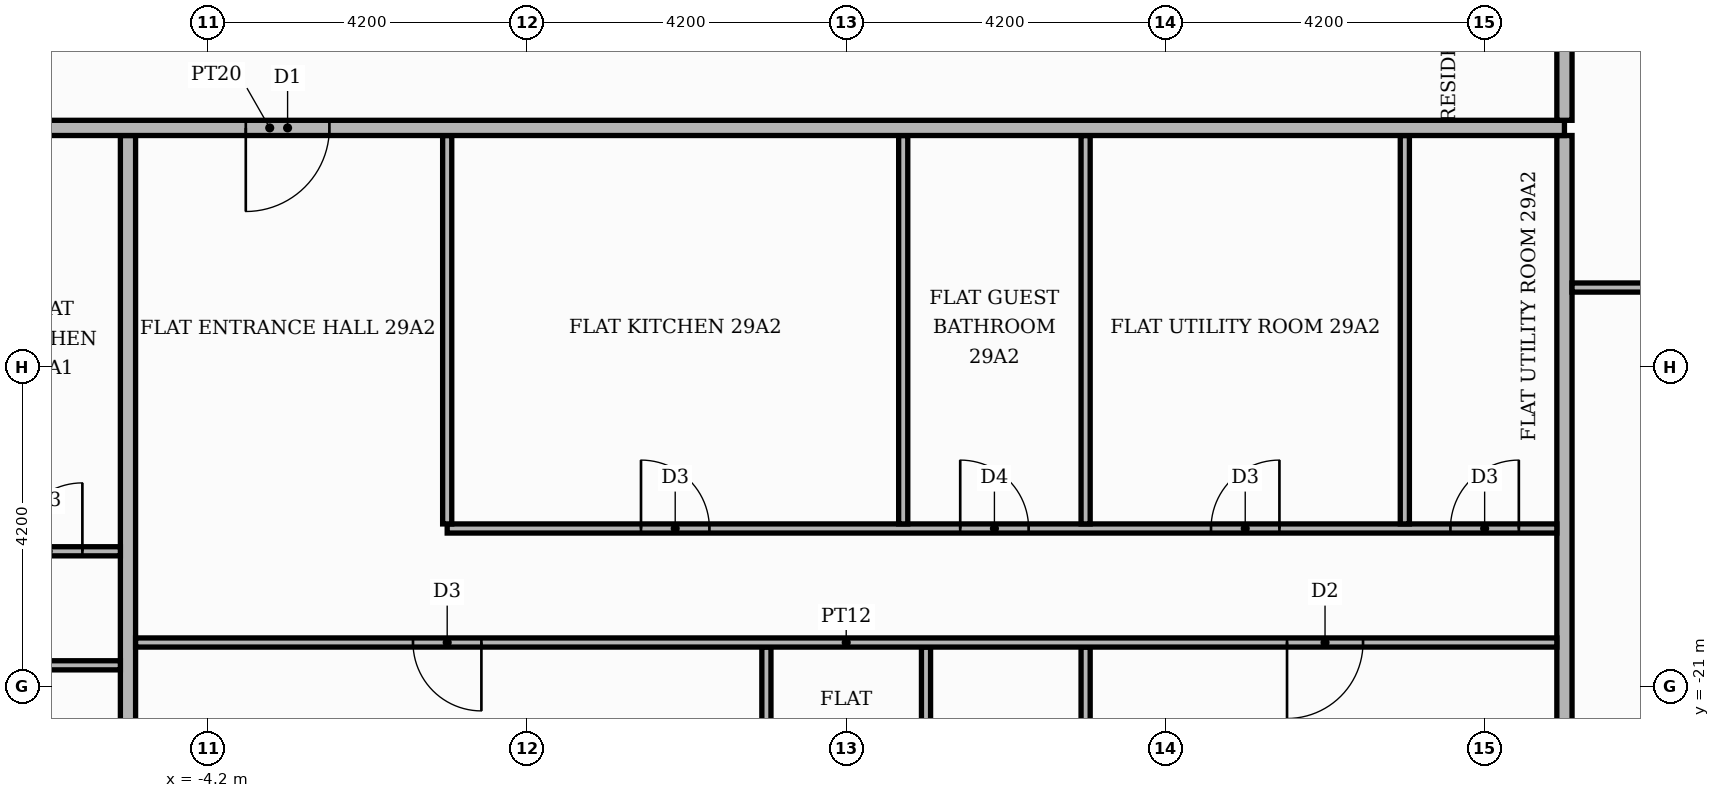
"""IFC4 building model, lengths in metres.
Left out: names, types, materials, properties, quantities, classifications, styles, units other than length and angle.
Written with IfcOpenShell. Run it as: python <this file> out.ifc"""

import sys

from ifc_helpers import new_model, si_unit, direction, frame, frame_2d, origin, place, context, subcontext, project, spatial, rectangle, extrude, element, fill, save


model = new_model("IFC4")
c1 = context("Model", 3, precision=1e-05, world=origin(), true_north=direction((0.0, 1.0)))
c2 = subcontext(c1, "Body", "Model", "MODEL_VIEW")
j1 = project(units=[si_unit("LENGTHUNIT", "METRE"), si_unit("PLANEANGLEUNIT", "RADIAN")], contexts=[c1])
p1 = place(None, origin())
s1 = spatial("IfcSite", under=j1, at=p1, CompositionType="ELEMENT")
p2 = place(p1, origin())
s2 = spatial("IfcBuilding", under=s1, at=p2, CompositionType="ELEMENT")
p3 = place(p2, frame((0.0, 0.0, 122.1)))
s3 = spatial("IfcBuildingStorey", under=s2, at=p3, CompositionType="ELEMENT", Elevation=122.1)
p4 = place(p3, frame((-5.25, -25.42, 0.0), z_axis=(0.0, 0.0, 1.0), x_axis=(0.0, 1.0, 0.0)))
e1 = element("IfcWall", 1, at=p4, inside=s3, PredefinedType="PARTITIONING", context=c2, shape_type="SweptSolid", body=[
    extrude(rectangle(XDim=11.67, YDim=0.2, at=frame_2d((5.835, 0.0))), origin(), (0.0, 0.0, 1.0), 3.4),
])
p5 = place(p3, frame((3.15, -25.42, 0.0), z_axis=(0.0, 0.0, 1.0), x_axis=(0.0, 1.0, 0.0)))
e2 = element("IfcWall", 2, at=p5, inside=s3, PredefinedType="PARTITIONING", context=c2, shape_type="SweptSolid", body=[
    extrude(rectangle(XDim=4.94, YDim=0.12, at=frame_2d((2.47, 0.0))), origin(), (0.0, 0.0, 1.0), 3.4),
])
p6 = place(p5, frame((1.9, 0.0, 0.0)))
e3 = element("IfcOpeningElement", 3, at=p6, cuts=e2, PredefinedType="OPENING", context=c2, shape_type="SweptSolid", body=[
    extrude(rectangle(XDim=0.9, YDim=2.1, at=frame_2d((0.45, 1.05))), frame((0.0, 0.07, 0.0), z_axis=(0.0, -1.0, 0.0), x_axis=(1.0, 0.0, 0.0)), (0.0, 0.0, 1.0), 0.14),
])
p7 = place(p3, frame((5.25, -25.42, 0.0), z_axis=(0.0, 0.0, 1.0), x_axis=(0.0, 1.0, 0.0)))
e4 = element("IfcWall", 4, at=p7, inside=s3, PredefinedType="PARTITIONING", context=c2, shape_type="SweptSolid", body=[
    extrude(rectangle(XDim=4.94, YDim=0.12, at=frame_2d((2.47, 0.0))), origin(), (0.0, 0.0, 1.0), 3.4),
])
p8 = place(p7, frame((1.9, 0.0, 0.0)))
e5 = element("IfcOpeningElement", 5, at=p8, cuts=e4, PredefinedType="OPENING", context=c2, shape_type="SweptSolid", body=[
    extrude(rectangle(XDim=0.9, YDim=2.1, at=frame_2d((0.45, 1.05))), frame((0.0, 0.07, 0.0), z_axis=(0.0, -1.0, 0.0), x_axis=(1.0, 0.0, 0.0)), (0.0, 0.0, 1.0), 0.14),
])
p9 = place(p3, frame((7.35, -25.42, 0.0), z_axis=(0.0, 0.0, 1.0), x_axis=(0.0, 1.0, 0.0)))
e6 = element("IfcWall", 6, at=p9, inside=s3, PredefinedType="PARTITIONING", context=c2, shape_type="SweptSolid", body=[
    extrude(rectangle(XDim=4.94, YDim=0.12, at=frame_2d((2.47, 0.0))), origin(), (0.0, 0.0, 1.0), 3.4),
])
p10 = place(p3, frame((13.65, -25.42, 0.0), z_axis=(0.0, 0.0, 1.0), x_axis=(0.0, 1.0, 0.0)))
e7 = element("IfcWall", 7, at=p10, inside=s3, PredefinedType="PARTITIONING", context=c2, shape_type="SweptSolid", body=[
    extrude(rectangle(XDim=11.67, YDim=0.2, at=frame_2d((5.835, 0.0))), origin(), (0.0, 0.0, 1.0), 3.4),
])
p11 = place(p3, frame((-25.42, -20.72, 0.0), z_axis=(0.0, 0.0, 1.0), x_axis=(1.0, 0.0, 0.0)))
e8 = element("IfcWall", 8, at=p11, inside=s3, PredefinedType="PARTITIONING", context=c2, shape_type="SweptSolid", body=[
    extrude(rectangle(XDim=20.07, YDim=0.12, at=frame_2d((10.035, 0.0))), origin(), (0.0, 0.0, 1.0), 3.4),
])
p12 = place(p11, frame((10.22, 0.0, 0.0)))
e9 = element("IfcOpeningElement", 9, at=p12, cuts=e8, PredefinedType="OPENING", context=c2, shape_type="SweptSolid", body=[
    extrude(rectangle(XDim=1.0, YDim=2.1, at=frame_2d((0.5, 1.05))), frame((0.0, 0.07, 0.0), z_axis=(0.0, -1.0, 0.0), x_axis=(1.0, 0.0, 0.0)), (0.0, 0.0, 1.0), 0.14),
])
p13 = place(p11, frame((13.42, 0.0, 0.0)))
e10 = element("IfcOpeningElement", 10, at=p13, cuts=e8, PredefinedType="OPENING", context=c2, shape_type="SweptSolid", body=[
    extrude(rectangle(XDim=0.9, YDim=2.1, at=frame_2d((0.45, 1.05))), frame((0.0, 0.07, 0.0), z_axis=(0.0, -1.0, 0.0), x_axis=(1.0, 0.0, 0.0)), (0.0, 0.0, 1.0), 0.14),
])
p14 = place(p3, frame((-5.15, -20.42, 0.0), z_axis=(0.0, 0.0, 1.0), x_axis=(1.0, 0.0, 0.0)))
e11 = element("IfcWall", 11, at=p14, inside=s3, PredefinedType="PARTITIONING", context=c2, shape_type="SweptSolid", body=[
    extrude(rectangle(XDim=18.7, YDim=0.12, at=frame_2d((9.35, 0.0))), origin(), (0.0, 0.0, 1.0), 3.4),
])
p15 = place(p14, frame((3.65, 0.0, 0.0)))
e12 = element("IfcOpeningElement", 12, at=p15, cuts=e11, PredefinedType="OPENING", context=c2, shape_type="SweptSolid", body=[
    extrude(rectangle(XDim=0.9, YDim=2.1, at=frame_2d((0.45, 1.05))), frame((0.0, 0.07, 0.0), z_axis=(0.0, -1.0, 0.0), x_axis=(1.0, 0.0, 0.0)), (0.0, 0.0, 1.0), 0.14),
])
p16 = place(p14, frame((15.15, 0.0, 0.0)))
e13 = element("IfcOpeningElement", 13, at=p16, cuts=e11, PredefinedType="OPENING", context=c2, shape_type="SweptSolid", body=[
    extrude(rectangle(XDim=1.0, YDim=2.1, at=frame_2d((0.5, 1.05))), frame((0.0, 0.07, 0.0), z_axis=(0.0, -1.0, 0.0), x_axis=(1.0, 0.0, 0.0)), (0.0, 0.0, 1.0), 0.14),
])
p17 = place(p3, frame((-9.45, -19.22, 0.0), z_axis=(0.0, 0.0, 1.0), x_axis=(1.0, 0.0, 0.0)))
e14 = element("IfcWall", 14, at=p17, inside=s3, PredefinedType="PARTITIONING", context=c2, shape_type="SweptSolid", body=[
    extrude(rectangle(XDim=4.1, YDim=0.12, at=frame_2d((2.05, 0.0))), origin(), (0.0, 0.0, 1.0), 3.4),
])
p18 = place(p17, frame((2.7, 0.0, 0.0)))
e15 = element("IfcOpeningElement", 15, at=p18, cuts=e14, PredefinedType="OPENING", context=c2, shape_type="SweptSolid", body=[
    extrude(rectangle(XDim=0.9, YDim=2.1, at=frame_2d((0.45, 1.05))), frame((0.0, 0.07, 0.0), z_axis=(0.0, -1.0, 0.0), x_axis=(1.0, 0.0, 0.0)), (0.0, 0.0, 1.0), 0.14),
])
p19 = place(p3, frame((-1.05, -18.92, 0.0), z_axis=(0.0, 0.0, 1.0), x_axis=(1.0, 0.0, 0.0)))
e16 = element("IfcWall", 16, at=p19, inside=s3, PredefinedType="PARTITIONING", context=c2, shape_type="SweptSolid", body=[
    extrude(rectangle(XDim=14.6, YDim=0.12, at=frame_2d((7.3, 0.0))), origin(), (0.0, 0.0, 1.0), 3.4),
])
p20 = place(p19, frame((2.55, 0.0, 0.0)))
e17 = element("IfcOpeningElement", 17, at=p20, cuts=e16, PredefinedType="OPENING", context=c2, shape_type="SweptSolid", body=[
    extrude(rectangle(XDim=0.9, YDim=2.1, at=frame_2d((0.45, 1.05))), frame((0.0, 0.07, 0.0), z_axis=(0.0, -1.0, 0.0), x_axis=(1.0, 0.0, 0.0)), (0.0, 0.0, 1.0), 0.14),
])
p21 = place(p19, frame((6.75, 0.0, 0.0)))
e18 = element("IfcOpeningElement", 18, at=p21, cuts=e16, PredefinedType="OPENING", context=c2, shape_type="SweptSolid", body=[
    extrude(rectangle(XDim=0.9, YDim=2.1, at=frame_2d((0.45, 1.05))), frame((0.0, 0.07, 0.0), z_axis=(0.0, -1.0, 0.0), x_axis=(1.0, 0.0, 0.0)), (0.0, 0.0, 1.0), 0.14),
])
p22 = place(p19, frame((10.05, 0.0, 0.0)))
e19 = element("IfcOpeningElement", 19, at=p22, cuts=e16, PredefinedType="OPENING", context=c2, shape_type="SweptSolid", body=[
    extrude(rectangle(XDim=0.9, YDim=2.1, at=frame_2d((0.45, 1.05))), frame((0.0, 0.07, 0.0), z_axis=(0.0, -1.0, 0.0), x_axis=(1.0, 0.0, 0.0)), (0.0, 0.0, 1.0), 0.14),
])
p23 = place(p19, frame((13.2, 0.0, 0.0)))
e20 = element("IfcOpeningElement", 20, at=p23, cuts=e16, PredefinedType="OPENING", context=c2, shape_type="SweptSolid", body=[
    extrude(rectangle(XDim=0.9, YDim=2.1, at=frame_2d((0.45, 1.05))), frame((0.0, 0.07, 0.0), z_axis=(0.0, -1.0, 0.0), x_axis=(1.0, 0.0, 0.0)), (0.0, 0.0, 1.0), 0.14),
])
for number, where, z_axis, x_axis in (
    (21, (-1.05, -18.86, 0.0), (0.0, 0.0, 1.0), (0.0, 1.0, 0.0)),
    (22, (4.95, -18.86, 0.0), (0.0, 0.0, 1.0), (0.0, 1.0, 0.0)),
    (23, (7.35, -18.86, 0.0), (0.0, 0.0, 1.0), (0.0, 1.0, 0.0)),
    (24, (11.55, -18.86, 0.0), (0.0, 0.0, 1.0), (0.0, 1.0, 0.0)),
):
    element("IfcWall", number, at=place(p3, frame(where, z_axis=z_axis, x_axis=x_axis)), inside=s3, PredefinedType="PARTITIONING", context=c2, shape_type="SweptSolid", body=[
        extrude(rectangle(XDim=5.11, YDim=0.12, at=frame_2d((2.555, 0.0))), origin(), (0.0, 0.0, 1.0), 3.4),
    ])
p24 = place(p3, frame((13.75, -15.75, 0.0), z_axis=(0.0, 0.0, 1.0), x_axis=(1.0, 0.0, 0.0)))
e25 = element("IfcWall", 25, at=p24, inside=s3, PredefinedType="PARTITIONING", context=c2, shape_type="SweptSolid", body=[
    extrude(rectangle(XDim=6.07, YDim=0.12, at=frame_2d((3.035, 0.0))), origin(), (0.0, 0.0, 1.0), 3.4),
])
p25 = place(p24, frame((2.485, 0.0, 0.0)))
e26 = element("IfcOpeningElement", 26, at=p25, cuts=e25, PredefinedType="OPENING", context=c2, shape_type="SweptSolid", body=[
    extrude(rectangle(XDim=1.0, YDim=2.1, at=frame_2d((0.5, 1.05))), frame((0.0, 0.07, 0.0), z_axis=(0.0, -1.0, 0.0), x_axis=(1.0, 0.0, 0.0)), (0.0, 0.0, 1.0), 0.14),
])
p26 = place(p3, frame((-20.42, -13.65, 0.0), z_axis=(0.0, 0.0, 1.0), x_axis=(1.0, 0.0, 0.0)))
e27 = element("IfcWall", 27, at=p26, inside=s3, PredefinedType="PARTITIONING", context=c2, shape_type="SweptSolid", body=[
    extrude(rectangle(XDim=34.07, YDim=0.2, at=frame_2d((17.035, 0.0))), origin(), (0.0, 0.0, 1.0), 3.4),
])
p27 = place(p26, frame((8.32, 0.0, 0.0)))
e28 = element("IfcOpeningElement", 28, at=p27, cuts=e27, PredefinedType="OPENING", context=c2, shape_type="SweptSolid", body=[
    extrude(rectangle(XDim=1.1, YDim=2.4, at=frame_2d((0.55, 1.2))), frame((0.0, 0.11, 0.0), z_axis=(0.0, -1.0, 0.0), x_axis=(1.0, 0.0, 0.0)), (0.0, 0.0, 1.0), 0.22),
])
p28 = place(p26, frame((16.72, 0.0, 0.0)))
e29 = element("IfcOpeningElement", 29, at=p28, cuts=e27, PredefinedType="OPENING", context=c2, shape_type="SweptSolid", body=[
    extrude(rectangle(XDim=1.1, YDim=2.4, at=frame_2d((0.55, 1.2))), frame((0.0, 0.11, 0.0), z_axis=(0.0, -1.0, 0.0), x_axis=(1.0, 0.0, 0.0)), (0.0, 0.0, 1.0), 0.22),
])
p29 = place(p3, frame((13.65, -13.55, 0.0), z_axis=(0.0, 0.0, 1.0), x_axis=(0.0, 1.0, 0.0)))
e30 = element("IfcWall", 30, at=p29, inside=s3, PredefinedType="PARTITIONING", context=c2, shape_type="SweptSolid", body=[
    extrude(rectangle(XDim=8.2, YDim=0.2, at=frame_2d((4.1, 0.0))), origin(), (0.0, 0.0, 1.0), 3.4),
])
p30 = place(p29, frame((1.45, 0.0, 0.0)))
e31 = element("IfcOpeningElement", 31, at=p30, cuts=e30, PredefinedType="OPENING", context=c2, shape_type="SweptSolid", body=[
    extrude(rectangle(XDim=1.1, YDim=2.4, at=frame_2d((0.55, 1.2))), frame((0.0, 0.11, 0.0), z_axis=(0.0, -1.0, 0.0), x_axis=(1.0, 0.0, 0.0)), (0.0, 0.0, 1.0), 0.22),
])
p31 = place(p18, origin())
e32 = element("IfcDoor", 32, at=p31, inside=s3, OperationType="SINGLE_SWING_RIGHT", PredefinedType="DOOR", context=c2, shape_type="SweptSolid", body=[
    extrude(rectangle(XDim=0.9, YDim=2.1, at=frame_2d((0.45, 1.05))), frame((0.0, 0.025, 0.0), z_axis=(0.0, -1.0, 0.0), x_axis=(1.0, 0.0, 0.0)), (0.0, 0.0, 1.0), 0.05),
])
fill(e15, e32)
p32 = place(p28, frame((1.1, 0.0, 0.0), z_axis=(0.0, 0.0, 1.0), x_axis=(-1.0, 0.0, 0.0)))
e33 = element("IfcDoor", 33, at=p32, inside=s3, OperationType="SINGLE_SWING_LEFT", PredefinedType="DOOR", context=c2, shape_type="SweptSolid", body=[
    extrude(rectangle(XDim=1.1, YDim=2.4, at=frame_2d((0.55, 1.2))), frame((0.0, 0.025, 0.0), z_axis=(0.0, -1.0, 0.0), x_axis=(1.0, 0.0, 0.0)), (0.0, 0.0, 1.0), 0.05),
])
fill(e29, e33)
p33 = place(p20, origin())
e34 = element("IfcDoor", 34, at=p33, inside=s3, OperationType="SINGLE_SWING_LEFT", PredefinedType="DOOR", context=c2, shape_type="SweptSolid", body=[
    extrude(rectangle(XDim=0.9, YDim=2.1, at=frame_2d((0.45, 1.05))), frame((0.0, 0.025, 0.0), z_axis=(0.0, -1.0, 0.0), x_axis=(1.0, 0.0, 0.0)), (0.0, 0.0, 1.0), 0.05),
])
fill(e17, e34)
p34 = place(p21, origin())
e35 = element("IfcDoor", 35, at=p34, inside=s3, OperationType="SINGLE_SWING_LEFT", PredefinedType="DOOR", context=c2, shape_type="SweptSolid", body=[
    extrude(rectangle(XDim=0.9, YDim=2.1, at=frame_2d((0.45, 1.05))), frame((0.0, 0.025, 0.0), z_axis=(0.0, -1.0, 0.0), x_axis=(1.0, 0.0, 0.0)), (0.0, 0.0, 1.0), 0.05),
])
fill(e18, e35)
p35 = place(p22, origin())
e36 = element("IfcDoor", 36, at=p35, inside=s3, OperationType="SINGLE_SWING_RIGHT", PredefinedType="DOOR", context=c2, shape_type="SweptSolid", body=[
    extrude(rectangle(XDim=0.9, YDim=2.1, at=frame_2d((0.45, 1.05))), frame((0.0, 0.025, 0.0), z_axis=(0.0, -1.0, 0.0), x_axis=(1.0, 0.0, 0.0)), (0.0, 0.0, 1.0), 0.05),
])
fill(e19, e36)
p36 = place(p23, origin())
e37 = element("IfcDoor", 37, at=p36, inside=s3, OperationType="SINGLE_SWING_RIGHT", PredefinedType="DOOR", context=c2, shape_type="SweptSolid", body=[
    extrude(rectangle(XDim=0.9, YDim=2.1, at=frame_2d((0.45, 1.05))), frame((0.0, 0.025, 0.0), z_axis=(0.0, -1.0, 0.0), x_axis=(1.0, 0.0, 0.0)), (0.0, 0.0, 1.0), 0.05),
])
fill(e20, e37)
p37 = place(p15, frame((0.9, 0.0, 0.0), z_axis=(0.0, 0.0, 1.0), x_axis=(-1.0, 0.0, 0.0)))
e38 = element("IfcDoor", 38, at=p37, inside=s3, OperationType="SINGLE_SWING_RIGHT", PredefinedType="DOOR", context=c2, shape_type="SweptSolid", body=[
    extrude(rectangle(XDim=0.9, YDim=2.1, at=frame_2d((0.45, 1.05))), frame((0.0, 0.025, 0.0), z_axis=(0.0, -1.0, 0.0), x_axis=(1.0, 0.0, 0.0)), (0.0, 0.0, 1.0), 0.05),
])
fill(e12, e38)
p38 = place(p16, frame((1.0, 0.0, 0.0), z_axis=(0.0, 0.0, 1.0), x_axis=(-1.0, 0.0, 0.0)))
e39 = element("IfcDoor", 39, at=p38, inside=s3, OperationType="SINGLE_SWING_LEFT", PredefinedType="DOOR", context=c2, shape_type="SweptSolid", body=[
    extrude(rectangle(XDim=1.0, YDim=2.1, at=frame_2d((0.5, 1.05))), frame((0.0, 0.025, 0.0), z_axis=(0.0, -1.0, 0.0), x_axis=(1.0, 0.0, 0.0)), (0.0, 0.0, 1.0), 0.05),
])
fill(e13, e39)
save(model, sys.argv[1])
